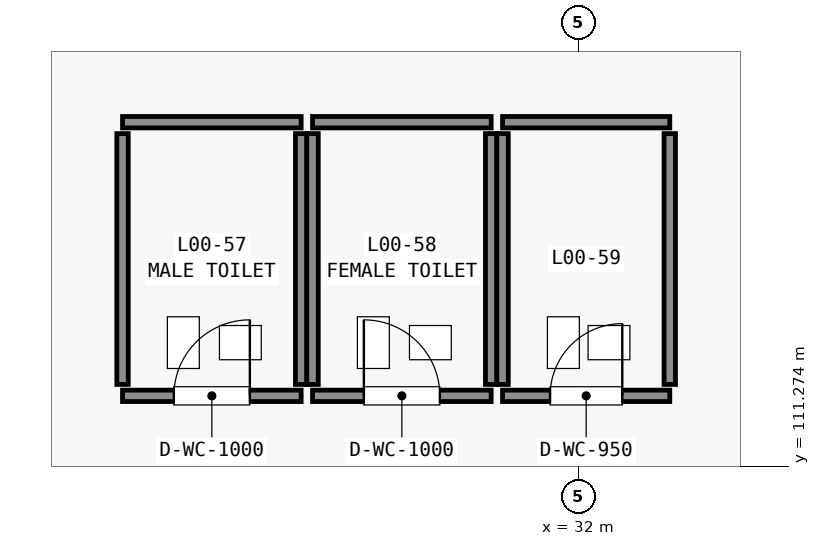
"""IFC4 building model, lengths in metres.
Left out: names, types, materials, properties, quantities, classifications, styles, units other than length and angle.
Written with IfcOpenShell. Run it as: python <this file> out.ifc"""

import sys

from ifc_helpers import new_model, si_unit, direction, frame, frame_2d, origin, place, context, subcontext, project, spatial, rectangle, extrude, element, fill, save


model = new_model("IFC4")
c1 = context("Model", 3, precision=1e-05, world=origin(), true_north=direction((0.0, 1.0)))
c2 = subcontext(c1, "Body", "Model", "MODEL_VIEW")
j1 = project(units=[si_unit("LENGTHUNIT", "METRE"), si_unit("PLANEANGLEUNIT", "RADIAN")], contexts=[c1])
p1 = place(None, origin())
s1 = spatial("IfcSite", under=j1, at=p1, CompositionType="ELEMENT")
p2 = place(p1, origin())
s2 = spatial("IfcBuilding", under=s1, at=p2, CompositionType="ELEMENT")
p3 = place(p2, origin())
s3 = spatial("IfcBuildingStorey", under=s2, at=p3, CompositionType="ELEMENT", Elevation=0.0)
p4 = place(p3, frame((26.0, 112.2, 0.0), z_axis=(0.0, 0.0, 1.0), x_axis=(1.0, 0.0, 0.0)))
e1 = element("IfcWall", 1, at=p4, inside=s3, PredefinedType="STANDARD", context=c2, shape_type="SweptSolid", body=[
    extrude(rectangle(XDim=2.35, YDim=0.15, at=frame_2d((1.175, 0.0))), origin(), (0.0, 0.0, 1.0), 5.64),
])
p5 = place(p4, frame((0.675, 0.0, 0.0)))
e2 = element("IfcOpeningElement", 2, at=p5, cuts=e1, PredefinedType="OPENING", context=c2, shape_type="SweptSolid", body=[
    extrude(rectangle(XDim=1.0, YDim=2.15, at=frame_2d((0.5, 1.075))), frame((0.0, 0.085, 0.0), z_axis=(0.0, -1.0, 0.0), x_axis=(1.0, 0.0, 0.0)), (0.0, 0.0, 1.0), 0.17),
])
p6 = place(p3, frame((26.0, 115.8, 0.0), z_axis=(0.0, 0.0, 1.0), x_axis=(1.0, 0.0, 0.0)))
e3 = element("IfcWall", 3, at=p6, inside=s3, PredefinedType="STANDARD", context=c2, shape_type="SweptSolid", body=[
    extrude(rectangle(XDim=2.35, YDim=0.15, at=frame_2d((1.175, 0.0))), origin(), (0.0, 0.0, 1.0), 5.64),
])
for number, where, z_axis, x_axis in (
    (4, (26.0, 112.35, 0.0), (0.0, 0.0, 1.0), (0.0, 1.0, 0.0)),
    (5, (28.35, 112.35, 0.0), (0.0, 0.0, 1.0), (0.0, 1.0, 0.0)),
):
    element("IfcWall", number, at=place(p3, frame(where, z_axis=z_axis, x_axis=x_axis)), inside=s3, PredefinedType="STANDARD", context=c2, shape_type="SweptSolid", body=[
        extrude(rectangle(XDim=3.3, YDim=0.15, at=frame_2d((1.65, 0.0))), origin(), (0.0, 0.0, 1.0), 5.183),
    ])
p7 = place(p3, frame((28.5, 112.2, 0.0), z_axis=(0.0, 0.0, 1.0), x_axis=(1.0, 0.0, 0.0)))
e6 = element("IfcWall", 6, at=p7, inside=s3, PredefinedType="STANDARD", context=c2, shape_type="SweptSolid", body=[
    extrude(rectangle(XDim=2.35, YDim=0.15, at=frame_2d((1.175, 0.0))), origin(), (0.0, 0.0, 1.0), 5.64),
])
p8 = place(p7, frame((0.675, 0.0, 0.0)))
e7 = element("IfcOpeningElement", 7, at=p8, cuts=e6, PredefinedType="OPENING", context=c2, shape_type="SweptSolid", body=[
    extrude(rectangle(XDim=1.0, YDim=2.15, at=frame_2d((0.5, 1.075))), frame((0.0, 0.085, 0.0), z_axis=(0.0, -1.0, 0.0), x_axis=(1.0, 0.0, 0.0)), (0.0, 0.0, 1.0), 0.17),
])
p9 = place(p3, frame((28.5, 115.8, 0.0), z_axis=(0.0, 0.0, 1.0), x_axis=(1.0, 0.0, 0.0)))
e8 = element("IfcWall", 8, at=p9, inside=s3, PredefinedType="STANDARD", context=c2, shape_type="SweptSolid", body=[
    extrude(rectangle(XDim=2.35, YDim=0.15, at=frame_2d((1.175, 0.0))), origin(), (0.0, 0.0, 1.0), 5.64),
])
for number, where, z_axis, x_axis in (
    (9, (28.5, 112.35, 0.0), (0.0, 0.0, 1.0), (0.0, 1.0, 0.0)),
    (10, (30.85, 112.35, 0.0), (0.0, 0.0, 1.0), (0.0, 1.0, 0.0)),
):
    element("IfcWall", number, at=place(p3, frame(where, z_axis=z_axis, x_axis=x_axis)), inside=s3, PredefinedType="STANDARD", context=c2, shape_type="SweptSolid", body=[
        extrude(rectangle(XDim=3.3, YDim=0.15, at=frame_2d((1.65, 0.0))), origin(), (0.0, 0.0, 1.0), 5.183),
    ])
p10 = place(p3, frame((31.0, 112.2, 0.0), z_axis=(0.0, 0.0, 1.0), x_axis=(1.0, 0.0, 0.0)))
e11 = element("IfcWall", 11, at=p10, inside=s3, PredefinedType="STANDARD", context=c2, shape_type="SweptSolid", body=[
    extrude(rectangle(XDim=2.2, YDim=0.15, at=frame_2d((1.1, 0.0))), origin(), (0.0, 0.0, 1.0), 5.64),
])
p11 = place(p10, frame((0.625, 0.0, 0.0)))
e12 = element("IfcOpeningElement", 12, at=p11, cuts=e11, PredefinedType="OPENING", context=c2, shape_type="SweptSolid", body=[
    extrude(rectangle(XDim=0.95, YDim=2.15, at=frame_2d((0.475, 1.075))), frame((0.0, 0.085, 0.0), z_axis=(0.0, -1.0, 0.0), x_axis=(1.0, 0.0, 0.0)), (0.0, 0.0, 1.0), 0.17),
])
p12 = place(p3, frame((31.0, 115.8, 0.0), z_axis=(0.0, 0.0, 1.0), x_axis=(1.0, 0.0, 0.0)))
e13 = element("IfcWall", 13, at=p12, inside=s3, PredefinedType="STANDARD", context=c2, shape_type="SweptSolid", body=[
    extrude(rectangle(XDim=2.2, YDim=0.15, at=frame_2d((1.1, 0.0))), origin(), (0.0, 0.0, 1.0), 5.64),
])
for number, where, z_axis, x_axis in (
    (14, (31.0, 112.35, 0.0), (0.0, 0.0, 1.0), (0.0, 1.0, 0.0)),
    (15, (33.2, 112.35, 0.0), (0.0, 0.0, 1.0), (0.0, 1.0, 0.0)),
):
    element("IfcWall", number, at=place(p3, frame(where, z_axis=z_axis, x_axis=x_axis)), inside=s3, PredefinedType="STANDARD", context=c2, shape_type="SweptSolid", body=[
        extrude(rectangle(XDim=3.3, YDim=0.15, at=frame_2d((1.65, 0.0))), origin(), (0.0, 0.0, 1.0), 5.183),
    ])
p13 = place(p5, origin())
e16 = element("IfcDoor", 16, at=p13, inside=s3, OperationType="SINGLE_SWING_RIGHT", PredefinedType="DOOR", context=c2, shape_type="SweptSolid", body=[
    extrude(rectangle(XDim=1.0, YDim=2.15, at=frame_2d((0.5, 1.075))), frame((0.0, 0.025, 0.0), z_axis=(0.0, -1.0, 0.0), x_axis=(1.0, 0.0, 0.0)), (0.0, 0.0, 1.0), 0.05),
])
fill(e2, e16)
p14 = place(p8, origin())
e17 = element("IfcDoor", 17, at=p14, inside=s3, OperationType="SINGLE_SWING_LEFT", PredefinedType="DOOR", context=c2, shape_type="SweptSolid", body=[
    extrude(rectangle(XDim=1.0, YDim=2.15, at=frame_2d((0.5, 1.075))), frame((0.0, 0.025, 0.0), z_axis=(0.0, -1.0, 0.0), x_axis=(1.0, 0.0, 0.0)), (0.0, 0.0, 1.0), 0.05),
])
fill(e7, e17)
p15 = place(p11, origin())
e18 = element("IfcDoor", 18, at=p15, inside=s3, OperationType="SINGLE_SWING_RIGHT", PredefinedType="DOOR", context=c2, shape_type="SweptSolid", body=[
    extrude(rectangle(XDim=0.95, YDim=2.15, at=frame_2d((0.475, 1.075))), frame((0.0, 0.025, 0.0), z_axis=(0.0, -1.0, 0.0), x_axis=(1.0, 0.0, 0.0)), (0.0, 0.0, 1.0), 0.05),
])
fill(e12, e18)
save(model, sys.argv[1])
